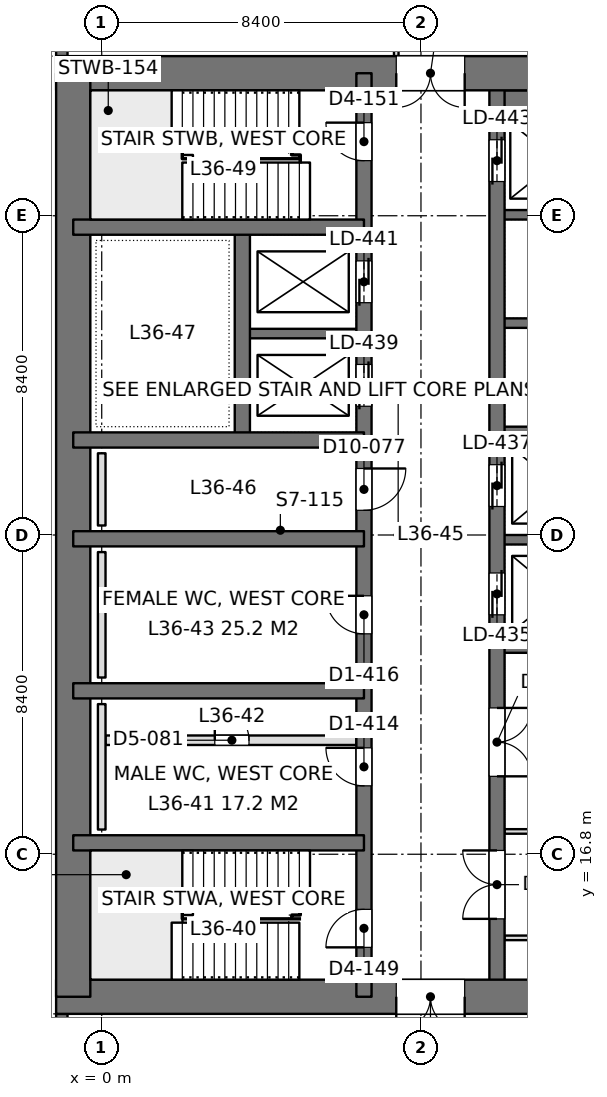
"""IFC4 building model, lengths in metres.
Left out: names, types, materials, properties, quantities, classifications, styles, units other than length and angle.
Written with IfcOpenShell. Run it as: python <this file> out.ifc"""

import sys

from ifc_helpers import new_model, si_unit, direction, frame, frame_2d, origin, place, context, subcontext, project, spatial, rectangle, extrude, element, fill, save


model = new_model("IFC4")
c1 = context("Model", 3, precision=1e-05, world=origin(), true_north=direction((0.0, 1.0)))
c2 = subcontext(c1, "Body", "Model", "MODEL_VIEW")
j1 = project(units=[si_unit("LENGTHUNIT", "METRE"), si_unit("PLANEANGLEUNIT", "RADIAN")], contexts=[c1])
p1 = place(None, origin())
s1 = spatial("IfcSite", under=j1, at=p1, CompositionType="ELEMENT")
p2 = place(p1, origin())
s2 = spatial("IfcBuilding", under=s1, at=p2, CompositionType="ELEMENT")
p3 = place(p2, frame((0.0, 0.0, 159.6)))
s3 = spatial("IfcBuildingStorey", under=s2, at=p3, CompositionType="ELEMENT", Elevation=159.6)
p4 = place(p3, frame((-1.2, 13.05, 0.0), z_axis=(0.0, 0.0, 1.0), x_axis=(1.0, 0.0, 0.0)))
e1 = element("IfcWall", 1, at=p4, inside=s3, PredefinedType="SHEAR", context=c2, shape_type="SweptSolid", body=[
    extrude(rectangle(XDim=18.0, YDim=0.9, at=frame_2d((9.0, 0.0))), origin(), (0.0, 0.0, 1.0), 4.2),
])
p5 = place(p4, frame((8.95, 0.0, 0.0)))
e2 = element("IfcOpeningElement", 2, at=p5, cuts=e1, PredefinedType="OPENING", context=c2, shape_type="SweptSolid", body=[
    extrude(rectangle(XDim=1.8, YDim=2.4, at=frame_2d((0.9, 1.2))), frame((0.0, 0.46, 0.0), z_axis=(0.0, -1.0, 0.0), x_axis=(1.0, 0.0, 0.0)), (0.0, 0.0, 1.0), 0.92),
])
p6 = place(p3, frame((-1.2, 37.35, 0.0), z_axis=(0.0, 0.0, 1.0), x_axis=(1.0, 0.0, 0.0)))
e3 = element("IfcWall", 3, at=p6, inside=s3, PredefinedType="SHEAR", context=c2, shape_type="SweptSolid", body=[
    extrude(rectangle(XDim=18.0, YDim=0.9, at=frame_2d((9.0, 0.0))), origin(), (0.0, 0.0, 1.0), 4.2),
])
p7 = place(p6, frame((8.95, 0.0, 0.0)))
e4 = element("IfcOpeningElement", 4, at=p7, cuts=e3, PredefinedType="OPENING", context=c2, shape_type="SweptSolid", body=[
    extrude(rectangle(XDim=1.8, YDim=2.4, at=frame_2d((0.9, 1.2))), frame((0.0, 0.46, 0.0), z_axis=(0.0, -1.0, 0.0), x_axis=(1.0, 0.0, 0.0)), (0.0, 0.0, 1.0), 0.92),
])
p8 = place(p3, frame((-0.75, 13.05, 0.0), z_axis=(0.0, 0.0, 1.0), x_axis=(0.0, 1.0, 0.0)))
e5 = element("IfcWall", 5, at=p8, inside=s3, PredefinedType="SHEAR", context=c2, shape_type="SweptSolid", body=[
    extrude(rectangle(XDim=24.3, YDim=0.9, at=frame_2d((12.15, 0.0))), origin(), (0.0, 0.0, 1.0), 4.2),
])
p9 = place(p3, frame((6.9, 13.05, 0.0), z_axis=(0.0, 0.0, 1.0), x_axis=(0.0, 1.0, 0.0)))
e6 = element("IfcWall", 6, at=p9, inside=s3, PredefinedType="SHEAR", context=c2, shape_type="SweptSolid", body=[
    extrude(rectangle(XDim=24.3, YDim=0.4, at=frame_2d((12.15, 0.0))), origin(), (0.0, 0.0, 1.0), 4.2),
])
p10 = place(p9, frame((1.3, 0.0, 0.0)))
e7 = element("IfcOpeningElement", 7, at=p10, cuts=e6, PredefinedType="OPENING", context=c2, shape_type="SweptSolid", body=[
    extrude(rectangle(XDim=1.0, YDim=2.2, at=frame_2d((0.5, 1.1))), frame((0.0, 0.21, 0.0), z_axis=(0.0, -1.0, 0.0), x_axis=(1.0, 0.0, 0.0)), (0.0, 0.0, 1.0), 0.42),
])
p11 = place(p9, frame((22.0, 0.0, 0.0)))
e8 = element("IfcOpeningElement", 8, at=p11, cuts=e6, PredefinedType="OPENING", context=c2, shape_type="SweptSolid", body=[
    extrude(rectangle(XDim=1.0, YDim=2.2, at=frame_2d((0.5, 1.1))), frame((0.0, 0.21, 0.0), z_axis=(0.0, -1.0, 0.0), x_axis=(1.0, 0.0, 0.0)), (0.0, 0.0, 1.0), 0.42),
])
p12 = place(p9, frame((5.55, 0.0, 0.0)))
e9 = element("IfcOpeningElement", 9, at=p12, cuts=e6, PredefinedType="OPENING", context=c2, shape_type="SweptSolid", body=[
    extrude(rectangle(XDim=1.0, YDim=2.2, at=frame_2d((0.5, 1.1))), frame((0.0, 0.21, 0.0), z_axis=(0.0, -1.0, 0.0), x_axis=(1.0, 0.0, 0.0)), (0.0, 0.0, 1.0), 0.42),
])
p13 = place(p9, frame((9.55, 0.0, 0.0)))
e10 = element("IfcOpeningElement", 10, at=p13, cuts=e6, PredefinedType="OPENING", context=c2, shape_type="SweptSolid", body=[
    extrude(rectangle(XDim=1.0, YDim=2.2, at=frame_2d((0.5, 1.1))), frame((0.0, 0.21, 0.0), z_axis=(0.0, -1.0, 0.0), x_axis=(1.0, 0.0, 0.0)), (0.0, 0.0, 1.0), 0.42),
])
p14 = place(p9, frame((12.8, 0.0, 0.0)))
e11 = element("IfcOpeningElement", 11, at=p14, cuts=e6, PredefinedType="OPENING", context=c2, shape_type="SweptSolid", body=[
    extrude(rectangle(XDim=1.1, YDim=2.2, at=frame_2d((0.55, 1.1))), frame((0.0, 0.21, 0.0), z_axis=(0.0, -1.0, 0.0), x_axis=(1.0, 0.0, 0.0)), (0.0, 0.0, 1.0), 0.42),
])
p15 = place(p9, frame((15.538, 0.0, 0.0)))
e12 = element("IfcOpeningElement", 12, at=p15, cuts=e6, PredefinedType="OPENING", context=c2, shape_type="SweptSolid", body=[
    extrude(rectangle(XDim=1.1, YDim=2.2, at=frame_2d((0.55, 1.1))), frame((0.0, 0.21, 0.0), z_axis=(0.0, -1.0, 0.0), x_axis=(1.0, 0.0, 0.0)), (0.0, 0.0, 1.0), 0.42),
])
p16 = place(p9, frame((18.262, 0.0, 0.0)))
e13 = element("IfcOpeningElement", 13, at=p16, cuts=e6, PredefinedType="OPENING", context=c2, shape_type="SweptSolid", body=[
    extrude(rectangle(XDim=1.1, YDim=2.2, at=frame_2d((0.55, 1.1))), frame((0.0, 0.21, 0.0), z_axis=(0.0, -1.0, 0.0), x_axis=(1.0, 0.0, 0.0)), (0.0, 0.0, 1.0), 0.42),
])
p17 = place(p3, frame((10.4, 13.05, 0.0), z_axis=(0.0, 0.0, 1.0), x_axis=(0.0, 1.0, 0.0)))
e14 = element("IfcWall", 14, at=p17, inside=s3, PredefinedType="SHEAR", context=c2, shape_type="SweptSolid", body=[
    extrude(rectangle(XDim=24.3, YDim=0.4, at=frame_2d((12.15, 0.0))), origin(), (0.0, 0.0, 1.0), 4.2),
])
p18 = place(p17, frame((10.05, 0.0, 0.0)))
e15 = element("IfcOpeningElement", 15, at=p18, cuts=e14, PredefinedType="OPENING", context=c2, shape_type="SweptSolid", body=[
    extrude(rectangle(XDim=1.1, YDim=2.2, at=frame_2d((0.55, 1.1))), frame((0.0, 0.21, 0.0), z_axis=(0.0, -1.0, 0.0), x_axis=(1.0, 0.0, 0.0)), (0.0, 0.0, 1.0), 0.42),
])
p19 = place(p17, frame((12.9, 0.0, 0.0)))
e16 = element("IfcOpeningElement", 16, at=p19, cuts=e14, PredefinedType="OPENING", context=c2, shape_type="SweptSolid", body=[
    extrude(rectangle(XDim=1.1, YDim=2.2, at=frame_2d((0.55, 1.1))), frame((0.0, 0.21, 0.0), z_axis=(0.0, -1.0, 0.0), x_axis=(1.0, 0.0, 0.0)), (0.0, 0.0, 1.0), 0.42),
])
p20 = place(p17, frame((21.45, 0.0, 0.0)))
e17 = element("IfcOpeningElement", 17, at=p20, cuts=e14, PredefinedType="OPENING", context=c2, shape_type="SweptSolid", body=[
    extrude(rectangle(XDim=1.1, YDim=2.2, at=frame_2d((0.55, 1.1))), frame((0.0, 0.21, 0.0), z_axis=(0.0, -1.0, 0.0), x_axis=(1.0, 0.0, 0.0)), (0.0, 0.0, 1.0), 0.42),
])
p21 = place(p17, frame((2.05, 0.0, 0.0)))
e18 = element("IfcOpeningElement", 18, at=p21, cuts=e14, PredefinedType="OPENING", context=c2, shape_type="SweptSolid", body=[
    extrude(rectangle(XDim=1.8, YDim=2.4, at=frame_2d((0.9, 1.2))), frame((0.0, 0.21, 0.0), z_axis=(0.0, -1.0, 0.0), x_axis=(1.0, 0.0, 0.0)), (0.0, 0.0, 1.0), 0.42),
])
p22 = place(p17, frame((5.8, 0.0, 0.0)))
e19 = element("IfcOpeningElement", 19, at=p22, cuts=e14, PredefinedType="OPENING", context=c2, shape_type="SweptSolid", body=[
    extrude(rectangle(XDim=1.8, YDim=2.4, at=frame_2d((0.9, 1.2))), frame((0.0, 0.21, 0.0), z_axis=(0.0, -1.0, 0.0), x_axis=(1.0, 0.0, 0.0)), (0.0, 0.0, 1.0), 0.42),
])
for number, where, z_axis, x_axis in (
    (20, (-0.75, 17.1, 0.0), (0.0, 0.0, 1.0), (1.0, 0.0, 0.0)),
    (21, (-0.75, 21.1, 0.0), (0.0, 0.0, 1.0), (1.0, 0.0, 0.0)),
    (22, (-0.75, 25.1, 0.0), (0.0, 0.0, 1.0), (1.0, 0.0, 0.0)),
    (23, (-0.75, 27.7, 0.0), (0.0, 0.0, 1.0), (1.0, 0.0, 0.0)),
    (24, (-0.75, 33.3, 0.0), (0.0, 0.0, 1.0), (1.0, 0.0, 0.0)),
):
    element("IfcWall", number, at=place(p3, frame(where, z_axis=z_axis, x_axis=x_axis)), inside=s3, PredefinedType="SHEAR", context=c2, shape_type="SweptSolid", body=[
        extrude(rectangle(XDim=7.65, YDim=0.4, at=frame_2d((3.825, 0.0))), origin(), (0.0, 0.0, 1.0), 4.2),
    ])
p23 = place(p3, frame((3.7, 27.7, 0.0), z_axis=(0.0, 0.0, 1.0), x_axis=(0.0, 1.0, 0.0)))
e25 = element("IfcWall", 25, at=p23, inside=s3, PredefinedType="SHEAR", context=c2, shape_type="SweptSolid", body=[
    extrude(rectangle(XDim=5.6, YDim=0.4, at=frame_2d((2.8, 0.0))), origin(), (0.0, 0.0, 1.0), 4.2),
])
p24 = place(p3, frame((3.7, 30.5, 0.0), z_axis=(0.0, 0.0, 1.0), x_axis=(1.0, 0.0, 0.0)))
e26 = element("IfcWall", 26, at=p24, inside=s3, PredefinedType="SHEAR", context=c2, shape_type="SweptSolid", body=[
    extrude(rectangle(XDim=3.2, YDim=0.25, at=frame_2d((1.6, 0.0))), origin(), (0.0, 0.0, 1.0), 4.2),
])
p25 = place(p3, frame((10.4, 22.225, 0.0), z_axis=(0.0, 0.0, 1.0), x_axis=(1.0, 0.0, 0.0)))
e27 = element("IfcWall", 27, at=p25, inside=s3, PredefinedType="SHEAR", context=c2, shape_type="SweptSolid", body=[
    extrude(rectangle(XDim=5.95, YDim=0.25, at=frame_2d((2.975, 0.0))), origin(), (0.0, 0.0, 1.0), 4.2),
])
for number, where, z_axis, x_axis in (
    (28, (10.4, 25.075, 0.0), (0.0, 0.0, 1.0), (1.0, 0.0, 0.0)),
    (29, (10.4, 27.925, 0.0), (0.0, 0.0, 1.0), (1.0, 0.0, 0.0)),
    (30, (10.4, 30.775, 0.0), (0.0, 0.0, 1.0), (1.0, 0.0, 0.0)),
    (31, (10.4, 33.625, 0.0), (0.0, 0.0, 1.0), (1.0, 0.0, 0.0)),
):
    element("IfcWall", number, at=place(p3, frame(where, z_axis=z_axis, x_axis=x_axis)), inside=s3, PredefinedType="SHEAR", context=c2, shape_type="SweptSolid", body=[
        extrude(rectangle(XDim=3.2, YDim=0.25, at=frame_2d((1.6, 0.0))), origin(), (0.0, 0.0, 1.0), 4.2),
    ])
p26 = place(p3, frame((10.4, 36.625, 0.0), z_axis=(0.0, 0.0, 1.0), x_axis=(1.0, 0.0, 0.0)))
e32 = element("IfcWall", 32, at=p26, inside=s3, PredefinedType="SHEAR", context=c2, shape_type="SweptSolid", body=[
    extrude(rectangle(XDim=3.2, YDim=0.55, at=frame_2d((1.6, 0.0))), origin(), (0.0, 0.0, 1.0), 4.2),
])
p27 = place(p3, frame((-1.05, 8.4, 0.0), z_axis=(0.0, 0.0, 1.0), x_axis=(0.0, 1.0, 0.0)))
e33 = element("IfcWall", 33, at=p27, inside=s3, PredefinedType="SOLIDWALL", context=c2, shape_type="SweptSolid", body=[
    extrude(rectangle(XDim=4.2, YDim=0.3, at=frame_2d((2.1, 0.0))), origin(), (0.0, 0.0, 1.0), 4.05),
])
p28 = place(p27, frame((0.9, 0.0, 0.9)))
e34 = element("IfcOpeningElement", 34, at=p28, cuts=e33, PredefinedType="OPENING", context=c2, shape_type="SweptSolid", body=[
    extrude(rectangle(XDim=2.4, YDim=1.9, at=frame_2d((1.2, 0.95))), frame((0.0, 0.16, 0.0), z_axis=(0.0, -1.0, 0.0), x_axis=(1.0, 0.0, 0.0)), (0.0, 0.0, 1.0), 0.32),
])
p29 = place(p3, frame((-1.05, 37.8, 0.0), z_axis=(0.0, 0.0, 1.0), x_axis=(0.0, 1.0, 0.0)))
e35 = element("IfcWall", 35, at=p29, inside=s3, PredefinedType="SOLIDWALL", context=c2, shape_type="SweptSolid", body=[
    extrude(rectangle(XDim=4.2, YDim=0.3, at=frame_2d((2.1, 0.0))), origin(), (0.0, 0.0, 1.0), 4.05),
])
p30 = place(p29, frame((0.9, 0.0, 0.9)))
e36 = element("IfcOpeningElement", 36, at=p30, cuts=e35, PredefinedType="OPENING", context=c2, shape_type="SweptSolid", body=[
    extrude(rectangle(XDim=2.4, YDim=1.9, at=frame_2d((1.2, 0.95))), frame((0.0, 0.16, 0.0), z_axis=(0.0, -1.0, 0.0), x_axis=(1.0, 0.0, 0.0)), (0.0, 0.0, 1.0), 0.32),
])
p31 = place(p3, frame((10.598, 17.4, 0.0), z_axis=(0.0, 0.0, 1.0), x_axis=(1.0, 0.0, 0.0)))
e37 = element("IfcWall", 37, at=p31, inside=s3, PredefinedType="PARTITIONING", context=c2, shape_type="SweptSolid", body=[
    extrude(rectangle(XDim=5.904, YDim=0.12, at=frame_2d((2.952, 0.0))), origin(), (0.0, 0.0, 1.0), 3.55),
])
p32 = place(p31, frame((4.524, 0.0, 0.0)))
e38 = element("IfcOpeningElement", 38, at=p32, cuts=e37, PredefinedType="OPENING", context=c2, shape_type="SweptSolid", body=[
    extrude(rectangle(XDim=1.0, YDim=2.4, at=frame_2d((0.5, 1.2))), frame((0.0, 0.07, 0.0), z_axis=(0.0, -1.0, 0.0), x_axis=(1.0, 0.0, 0.0)), (0.0, 0.0, 1.0), 0.14),
])
p33 = place(p3, frame((10.598, 14.6, 0.0), z_axis=(0.0, 0.0, 1.0), x_axis=(1.0, 0.0, 0.0)))
e39 = element("IfcWall", 39, at=p33, inside=s3, PredefinedType="PARTITIONING", context=c2, shape_type="SweptSolid", body=[
    extrude(rectangle(XDim=6.204, YDim=0.12, at=frame_2d((3.102, 0.0))), origin(), (0.0, 0.0, 1.0), 3.55),
])
p34 = place(p3, frame((7.75, 37.8, 0.0), z_axis=(0.0, 0.0, 1.0), x_axis=(0.0, 1.0, 0.0)))
e40 = element("IfcWall", 40, at=p34, inside=s3, PredefinedType="PARTITIONING", context=c2, shape_type="SweptSolid", body=[
    extrude(rectangle(XDim=2.0, YDim=0.12, at=frame_2d((1.0, 0.0))), origin(), (0.0, 0.0, 1.0), 4.05),
])
p35 = place(p3, frame((0.1, 19.8, 0.0), z_axis=(0.0, 0.0, 1.0), x_axis=(1.0, 0.0, 0.0)))
e41 = element("IfcWall", 41, at=p35, inside=s3, PredefinedType="PARTITIONING", context=c2, shape_type="SweptSolid", body=[
    extrude(rectangle(XDim=6.6, YDim=0.25, at=frame_2d((3.3, 0.0))), origin(), (0.0, 0.0, 1.0), 4.0),
])
p36 = place(p35, frame((2.875, 0.0, 0.0)))
e42 = element("IfcOpeningElement", 42, at=p36, cuts=e41, PredefinedType="OPENING", context=c2, shape_type="SweptSolid", body=[
    extrude(rectangle(XDim=0.9, YDim=2.2, at=frame_2d((0.45, 1.1))), frame((0.0, 0.135, 0.0), z_axis=(0.0, -1.0, 0.0), x_axis=(1.0, 0.0, 0.0)), (0.0, 0.0, 1.0), 0.27),
])
for number, where, z_axis, x_axis in (
    (43, (0.0, 17.45, 0.0), (0.0, 0.0, 1.0), (0.0, 1.0, 0.0)),
    (44, (0.0, 21.45, 0.0), (0.0, 0.0, 1.0), (0.0, 1.0, 0.0)),
):
    element("IfcWall", number, at=place(p3, frame(where, z_axis=z_axis, x_axis=x_axis)), inside=s3, PredefinedType="PLUMBINGWALL", context=c2, shape_type="SweptSolid", body=[
        extrude(rectangle(XDim=3.3, YDim=0.2, at=frame_2d((1.65, 0.0))), origin(), (0.0, 0.0, 1.0), 1.2),
    ])
p37 = place(p3, frame((0.0, 25.45, 0.0), z_axis=(0.0, 0.0, 1.0), x_axis=(0.0, 1.0, 0.0)))
e45 = element("IfcWall", 45, at=p37, inside=s3, PredefinedType="PLUMBINGWALL", context=c2, shape_type="SweptSolid", body=[
    extrude(rectangle(XDim=1.9, YDim=0.2, at=frame_2d((0.95, 0.0))), origin(), (0.0, 0.0, 1.0), 1.2),
])
p38 = place(p5, frame((1.8, 0.0, 0.0), z_axis=(0.0, 0.0, 1.0), x_axis=(-1.0, 0.0, 0.0)))
e46 = element("IfcDoor", 46, at=p38, inside=s3, OperationType="DOUBLE_DOOR_SINGLE_SWING", PredefinedType="DOOR", context=c2, shape_type="SweptSolid", body=[
    extrude(rectangle(XDim=1.8, YDim=2.4, at=frame_2d((0.9, 1.2))), frame((0.0, 0.025, 0.0), z_axis=(0.0, -1.0, 0.0), x_axis=(1.0, 0.0, 0.0)), (0.0, 0.0, 1.0), 0.05),
])
fill(e2, e46)
p39 = place(p7, frame((1.8, 0.0, 0.0), z_axis=(0.0, 0.0, 1.0), x_axis=(-1.0, 0.0, 0.0)))
e47 = element("IfcDoor", 47, at=p39, inside=s3, OperationType="DOUBLE_DOOR_SINGLE_SWING", PredefinedType="DOOR", context=c2, shape_type="SweptSolid", body=[
    extrude(rectangle(XDim=1.8, YDim=2.4, at=frame_2d((0.9, 1.2))), frame((0.0, 0.025, 0.0), z_axis=(0.0, -1.0, 0.0), x_axis=(1.0, 0.0, 0.0)), (0.0, 0.0, 1.0), 0.05),
])
fill(e4, e47)
p40 = place(p10, origin())
e48 = element("IfcDoor", 48, at=p40, inside=s3, OperationType="SINGLE_SWING_LEFT", PredefinedType="DOOR", context=c2, shape_type="SweptSolid", body=[
    extrude(rectangle(XDim=1.0, YDim=2.2, at=frame_2d((0.5, 1.1))), frame((0.0, 0.025, 0.0), z_axis=(0.0, -1.0, 0.0), x_axis=(1.0, 0.0, 0.0)), (0.0, 0.0, 1.0), 0.05),
])
fill(e7, e48)
p41 = place(p11, origin())
e49 = element("IfcDoor", 49, at=p41, inside=s3, OperationType="SINGLE_SWING_RIGHT", PredefinedType="DOOR", context=c2, shape_type="SweptSolid", body=[
    extrude(rectangle(XDim=1.0, YDim=2.2, at=frame_2d((0.5, 1.1))), frame((0.0, 0.025, 0.0), z_axis=(0.0, -1.0, 0.0), x_axis=(1.0, 0.0, 0.0)), (0.0, 0.0, 1.0), 0.05),
])
fill(e8, e49)
p42 = place(p12, origin())
e50 = element("IfcDoor", 50, at=p42, inside=s3, OperationType="SINGLE_SWING_RIGHT", PredefinedType="DOOR", context=c2, shape_type="SweptSolid", body=[
    extrude(rectangle(XDim=1.0, YDim=2.2, at=frame_2d((0.5, 1.1))), frame((0.0, 0.025, 0.0), z_axis=(0.0, -1.0, 0.0), x_axis=(1.0, 0.0, 0.0)), (0.0, 0.0, 1.0), 0.05),
])
fill(e9, e50)
p43 = place(p13, origin())
e51 = element("IfcDoor", 51, at=p43, inside=s3, OperationType="SINGLE_SWING_RIGHT", PredefinedType="DOOR", context=c2, shape_type="SweptSolid", body=[
    extrude(rectangle(XDim=1.0, YDim=2.2, at=frame_2d((0.5, 1.1))), frame((0.0, 0.025, 0.0), z_axis=(0.0, -1.0, 0.0), x_axis=(1.0, 0.0, 0.0)), (0.0, 0.0, 1.0), 0.05),
])
fill(e10, e51)
p44 = place(p14, frame((1.1, 0.0, 0.0), z_axis=(0.0, 0.0, 1.0), x_axis=(-1.0, 0.0, 0.0)))
e52 = element("IfcDoor", 52, at=p44, inside=s3, OperationType="SINGLE_SWING_LEFT", PredefinedType="DOOR", context=c2, shape_type="SweptSolid", body=[
    extrude(rectangle(XDim=1.1, YDim=2.2, at=frame_2d((0.55, 1.1))), frame((0.0, 0.025, 0.0), z_axis=(0.0, -1.0, 0.0), x_axis=(1.0, 0.0, 0.0)), (0.0, 0.0, 1.0), 0.05),
])
fill(e11, e52)
p45 = place(p18, origin())
e53 = element("IfcDoor", 53, at=p45, inside=s3, OperationType="DOUBLE_DOOR_SLIDING", PredefinedType="DOOR", context=c2, shape_type="SweptSolid", body=[
    extrude(rectangle(XDim=1.1, YDim=2.2, at=frame_2d((0.55, 1.1))), frame((0.0, 0.025, 0.0), z_axis=(0.0, -1.0, 0.0), x_axis=(1.0, 0.0, 0.0)), (0.0, 0.0, 1.0), 0.05),
])
fill(e15, e53)
p46 = place(p19, origin())
e54 = element("IfcDoor", 54, at=p46, inside=s3, OperationType="DOUBLE_DOOR_SLIDING", PredefinedType="DOOR", context=c2, shape_type="SweptSolid", body=[
    extrude(rectangle(XDim=1.1, YDim=2.2, at=frame_2d((0.55, 1.1))), frame((0.0, 0.025, 0.0), z_axis=(0.0, -1.0, 0.0), x_axis=(1.0, 0.0, 0.0)), (0.0, 0.0, 1.0), 0.05),
])
fill(e16, e54)
p47 = place(p20, origin())
e55 = element("IfcDoor", 55, at=p47, inside=s3, OperationType="DOUBLE_DOOR_SLIDING", PredefinedType="DOOR", context=c2, shape_type="SweptSolid", body=[
    extrude(rectangle(XDim=1.1, YDim=2.2, at=frame_2d((0.55, 1.1))), frame((0.0, 0.025, 0.0), z_axis=(0.0, -1.0, 0.0), x_axis=(1.0, 0.0, 0.0)), (0.0, 0.0, 1.0), 0.05),
])
fill(e17, e55)
p48 = place(p15, origin())
e56 = element("IfcDoor", 56, at=p48, inside=s3, OperationType="DOUBLE_DOOR_SLIDING", PredefinedType="DOOR", context=c2, shape_type="SweptSolid", body=[
    extrude(rectangle(XDim=1.1, YDim=2.2, at=frame_2d((0.55, 1.1))), frame((0.0, 0.025, 0.0), z_axis=(0.0, -1.0, 0.0), x_axis=(1.0, 0.0, 0.0)), (0.0, 0.0, 1.0), 0.05),
])
fill(e12, e56)
p49 = place(p16, origin())
e57 = element("IfcDoor", 57, at=p49, inside=s3, OperationType="DOUBLE_DOOR_SLIDING", PredefinedType="DOOR", context=c2, shape_type="SweptSolid", body=[
    extrude(rectangle(XDim=1.1, YDim=2.2, at=frame_2d((0.55, 1.1))), frame((0.0, 0.025, 0.0), z_axis=(0.0, -1.0, 0.0), x_axis=(1.0, 0.0, 0.0)), (0.0, 0.0, 1.0), 0.05),
])
fill(e13, e57)
p50 = place(p21, origin())
e58 = element("IfcDoor", 58, at=p50, inside=s3, OperationType="DOUBLE_DOOR_SINGLE_SWING", PredefinedType="DOOR", context=c2, shape_type="SweptSolid", body=[
    extrude(rectangle(XDim=1.8, YDim=2.4, at=frame_2d((0.9, 1.2))), frame((0.0, 0.025, 0.0), z_axis=(0.0, -1.0, 0.0), x_axis=(1.0, 0.0, 0.0)), (0.0, 0.0, 1.0), 0.05),
])
fill(e18, e58)
p51 = place(p22, frame((1.8, 0.0, 0.0), z_axis=(0.0, 0.0, 1.0), x_axis=(-1.0, 0.0, 0.0)))
e59 = element("IfcDoor", 59, at=p51, inside=s3, OperationType="DOUBLE_DOOR_SINGLE_SWING", PredefinedType="DOOR", context=c2, shape_type="SweptSolid", body=[
    extrude(rectangle(XDim=1.8, YDim=2.4, at=frame_2d((0.9, 1.2))), frame((0.0, 0.025, 0.0), z_axis=(0.0, -1.0, 0.0), x_axis=(1.0, 0.0, 0.0)), (0.0, 0.0, 1.0), 0.05),
])
fill(e19, e59)
p52 = place(p36, origin())
e60 = element("IfcDoor", 60, at=p52, inside=s3, OperationType="SINGLE_SWING_LEFT", PredefinedType="DOOR", context=c2, shape_type="SweptSolid", body=[
    extrude(rectangle(XDim=0.9, YDim=2.2, at=frame_2d((0.45, 1.1))), frame((0.0, 0.025, 0.0), z_axis=(0.0, -1.0, 0.0), x_axis=(1.0, 0.0, 0.0)), (0.0, 0.0, 1.0), 0.05),
])
fill(e42, e60)
save(model, sys.argv[1])
